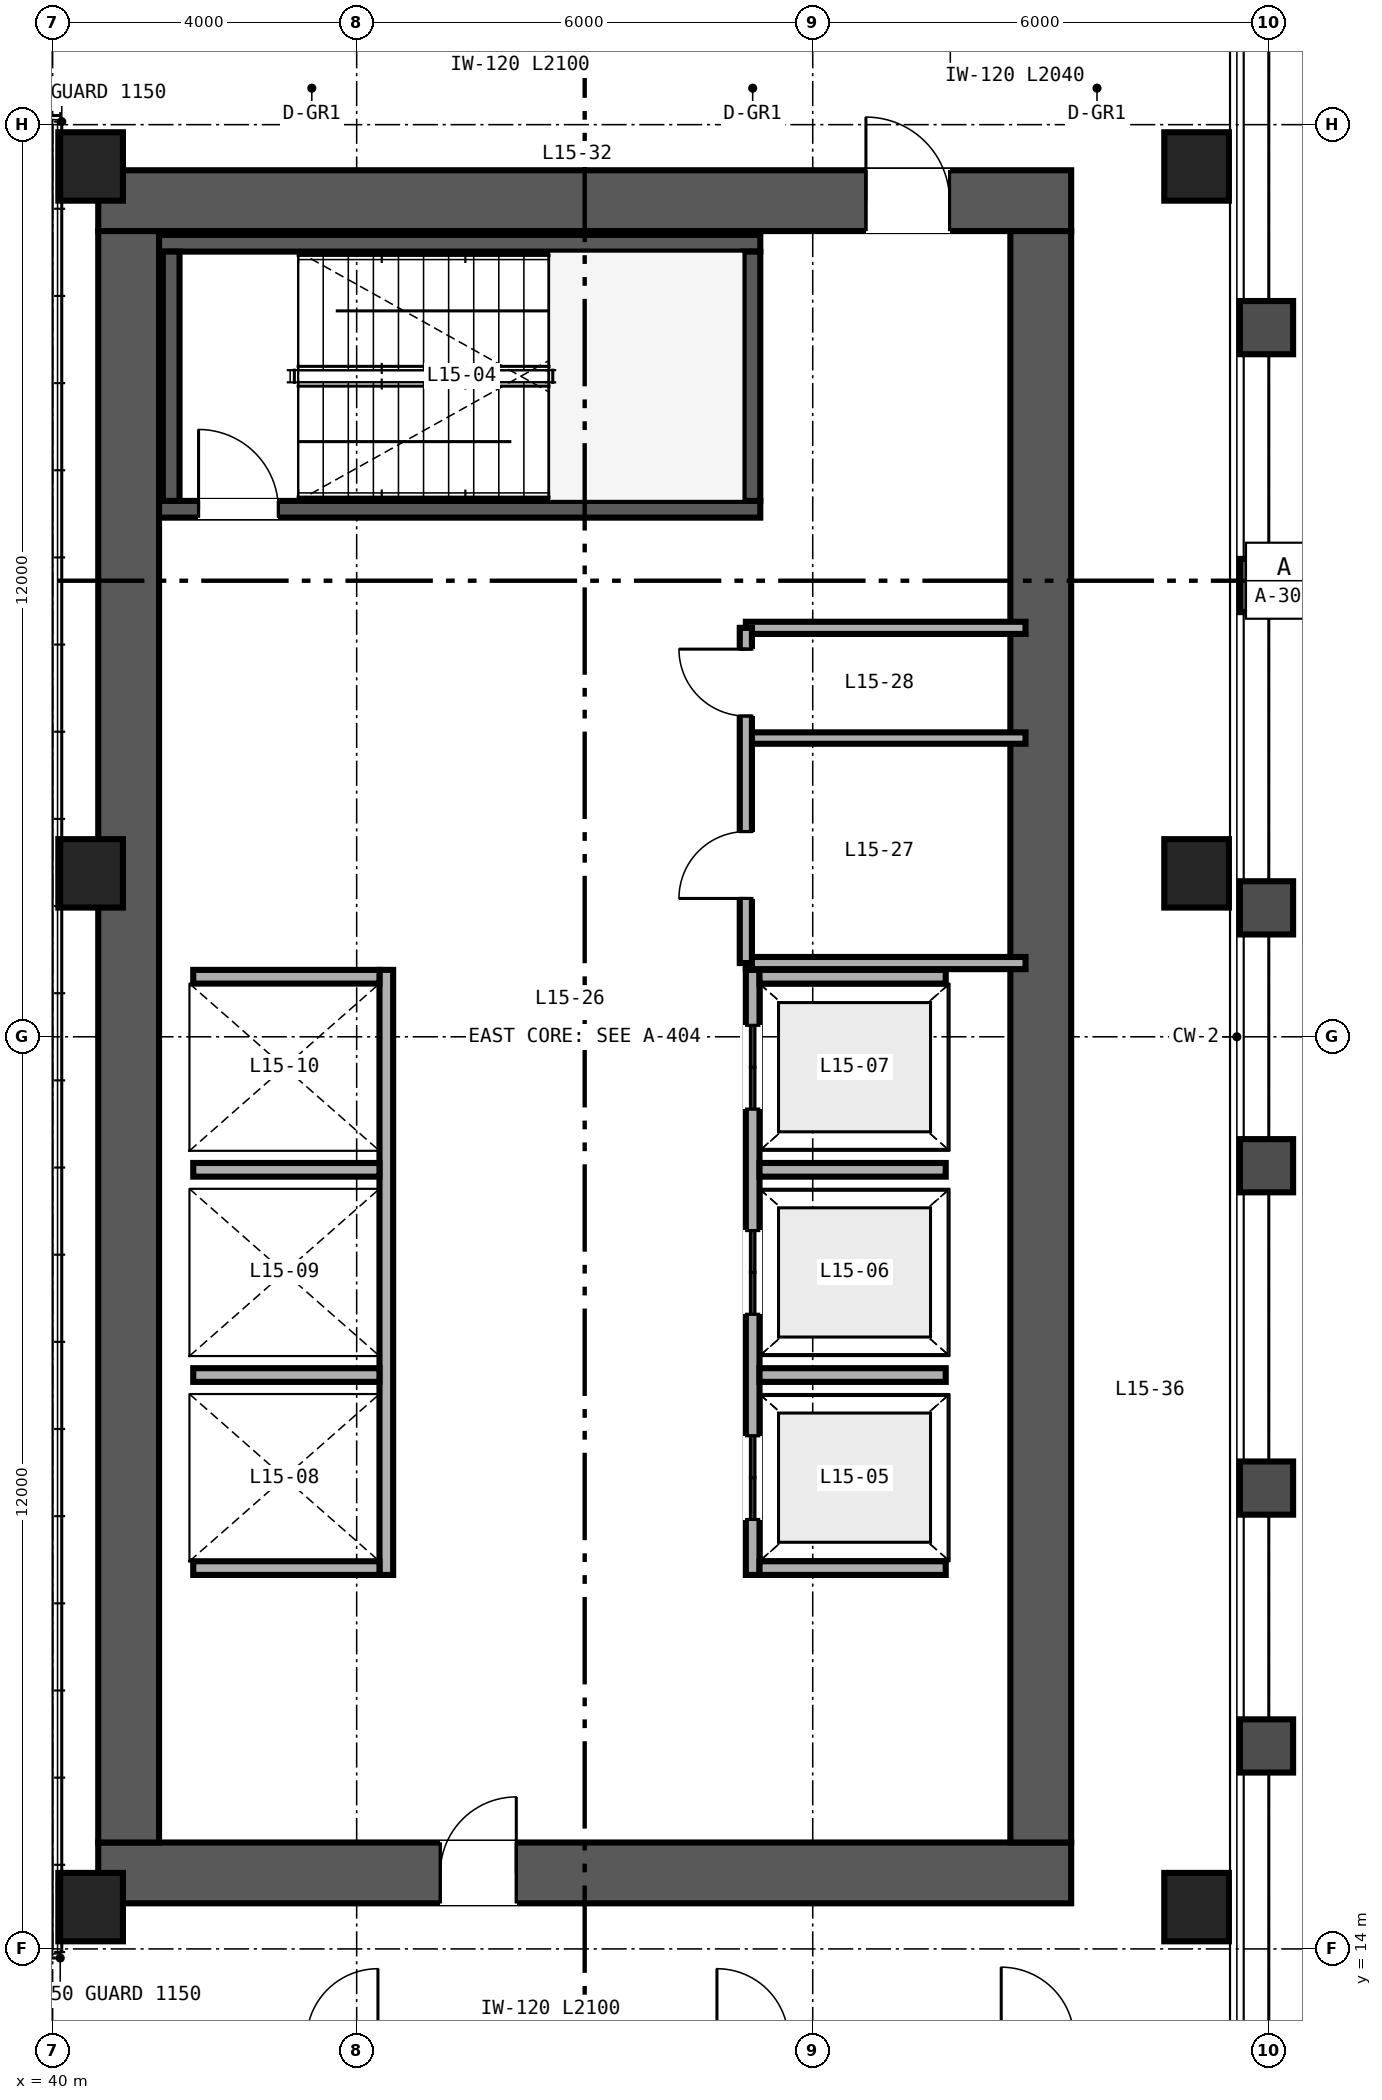
"""IFC4 building model, lengths in metres.
Left out: names, types, materials, properties, quantities, classifications, styles, units other than length and angle.
Written with IfcOpenShell. Run it as: python <this file> out.ifc"""

import sys

from ifc_helpers import new_model, si_unit, direction, frame, frame_2d, origin, origin_2d, place, context, subcontext, project, spatial, rectangle, hollow_rectangle, extrude, source, transform, mapped, element, fill, save


model = new_model("IFC4")
c1 = context("Model", 3, precision=1e-05, world=origin(), true_north=direction((0.0, 1.0)))
c2 = subcontext(c1, "Body", "Model", "MODEL_VIEW")
j1 = project(units=[si_unit("LENGTHUNIT", "METRE"), si_unit("PLANEANGLEUNIT", "RADIAN")], contexts=[c1])
p1 = place(None, origin())
s1 = spatial("IfcSite", under=j1, at=p1, CompositionType="ELEMENT")
p2 = place(p1, origin())
s2 = spatial("IfcBuilding", under=s1, at=p2, CompositionType="ELEMENT")
p3 = place(p2, frame((0.0, 0.0, 63.6)))
s3 = spatial("IfcBuildingStorey", under=s2, at=p3, CompositionType="ELEMENT", Elevation=63.6)
p4 = place(p3, frame((40.6, 15.0, 0.0), z_axis=(0.0, 0.0, 1.0), x_axis=(1.0, 0.0, 0.0)))
e1 = element("IfcWall", 1, at=p4, inside=s3, PredefinedType="SHEAR", context=c2, shape_type="SweptSolid", body=[
    extrude(rectangle(XDim=12.8, YDim=0.8, at=frame_2d((6.4, 0.0))), origin(), (0.0, 0.0, 1.0), 3.35),
])
p5 = place(p4, frame((4.5, 0.0, 0.0)))
e2 = element("IfcOpeningElement", 2, at=p5, cuts=e1, PredefinedType="OPENING", context=c2, shape_type="SweptSolid", body=[
    extrude(rectangle(XDim=1.0, YDim=2.15, at=frame_2d((0.5, 1.075))), frame((0.0, 0.41, 0.0), z_axis=(0.0, -1.0, 0.0), x_axis=(1.0, 0.0, 0.0)), (0.0, 0.0, 1.0), 0.82),
])
p6 = place(p3, frame((40.6, 37.0, 0.0), z_axis=(0.0, 0.0, 1.0), x_axis=(1.0, 0.0, 0.0)))
e3 = element("IfcWall", 3, at=p6, inside=s3, PredefinedType="SHEAR", context=c2, shape_type="SweptSolid", body=[
    extrude(rectangle(XDim=12.8, YDim=0.8, at=frame_2d((6.4, 0.0))), origin(), (0.0, 0.0, 1.0), 3.35),
])
p7 = place(p6, frame((10.1, 0.0, 0.0)))
e4 = element("IfcOpeningElement", 4, at=p7, cuts=e3, PredefinedType="OPENING", context=c2, shape_type="SweptSolid", body=[
    extrude(rectangle(XDim=1.1, YDim=2.15, at=frame_2d((0.55, 1.075))), frame((0.0, 0.41, 0.0), z_axis=(0.0, -1.0, 0.0), x_axis=(1.0, 0.0, 0.0)), (0.0, 0.0, 1.0), 0.82),
])
for number, where, z_axis, x_axis in (
    (5, (41.0, 15.4, 0.0), (0.0, 0.0, 1.0), (0.0, 1.0, 0.0)),
    (6, (53.0, 15.4, 0.0), (0.0, 0.0, 1.0), (0.0, 1.0, 0.0)),
):
    element("IfcWall", number, at=place(p3, frame(where, z_axis=z_axis, x_axis=x_axis)), inside=s3, PredefinedType="SHEAR", context=c2, shape_type="SweptSolid", body=[
        extrude(rectangle(XDim=21.2, YDim=0.8, at=frame_2d((10.6, 0.0))), origin(), (0.0, 0.0, 1.0), 3.35),
    ])
p8 = place(p3, frame((41.4, 32.94, 0.0), z_axis=(0.0, 0.0, 1.0), x_axis=(1.0, 0.0, 0.0)))
e7 = element("IfcWall", 7, at=p8, inside=s3, PredefinedType="SHEAR", context=c2, shape_type="SweptSolid", body=[
    extrude(rectangle(XDim=7.91, YDim=0.22, at=frame_2d((3.955, 0.0))), origin(), (0.0, 0.0, 1.0), 3.4),
])
p9 = place(p8, frame((0.52, 0.0, 0.0)))
e8 = element("IfcOpeningElement", 8, at=p9, cuts=e7, PredefinedType="OPENING", context=c2, shape_type="SweptSolid", body=[
    extrude(rectangle(XDim=1.05, YDim=2.15, at=frame_2d((0.525, 1.075))), frame((0.0, 0.12, 0.0), z_axis=(0.0, -1.0, 0.0), x_axis=(1.0, 0.0, 0.0)), (0.0, 0.0, 1.0), 0.24),
])
p10 = place(p3, frame((41.4, 36.44, 0.0), z_axis=(0.0, 0.0, 1.0), x_axis=(1.0, 0.0, 0.0)))
e9 = element("IfcWall", 9, at=p10, inside=s3, PredefinedType="SHEAR", context=c2, shape_type="SweptSolid", body=[
    extrude(rectangle(XDim=7.91, YDim=0.22, at=frame_2d((3.955, 0.0))), origin(), (0.0, 0.0, 1.0), 3.4),
])
for number, where, z_axis, x_axis in (
    (10, (41.56, 33.05, 0.0), (0.0, 0.0, 1.0), (0.0, 1.0, 0.0)),
    (11, (49.2, 33.05, 0.0), (0.0, 0.0, 1.0), (0.0, 1.0, 0.0)),
):
    element("IfcWall", number, at=place(p3, frame(where, z_axis=z_axis, x_axis=x_axis)), inside=s3, PredefinedType="SHEAR", context=c2, shape_type="SweptSolid", body=[
        extrude(rectangle(XDim=3.28, YDim=0.22, at=frame_2d((1.64, 0.0))), origin(), (0.0, 0.0, 1.0), 3.4),
    ])
m1 = source(origin(), c2, "Body", "SweptSolid", [
    extrude(hollow_rectangle(XDim=0.85, YDim=0.9, WallThickness=0.04, at=origin_2d()), origin(), (0.0, 0.0, 1.0), 3.35),
])
for number, where, z_axis, x_axis in (
    (12, (40.5, 14.55, 0.0), (0.0, 0.0, 1.0), (1.0, 0.0, 0.0)),
    (13, (55.05, 14.55, 0.0), (0.0, 0.0, 1.0), (1.0, 0.0, 0.0)),
    (14, (40.5, 28.15, 0.0), (0.0, 0.0, 1.0), (1.0, 0.0, 0.0)),
    (15, (55.05, 28.15, 0.0), (0.0, 0.0, 1.0), (1.0, 0.0, 0.0)),
    (16, (40.5, 37.45, 0.0), (0.0, 0.0, 1.0), (1.0, 0.0, 0.0)),
    (17, (55.05, 37.45, 0.0), (0.0, 0.0, 1.0), (1.0, 0.0, 0.0)),
):
    element("IfcColumn", number, at=place(p3, frame(where, z_axis=z_axis, x_axis=x_axis)), inside=s3, PredefinedType="COLUMN", context=c2, shape_type="MappedRepresentation", body=[
        mapped(m1, transform((0.0, 0.0, 0.0), scale=1.0)),
    ])
p11 = place(p3, frame((49.21, 18.92, 0.0), z_axis=(0.0, 0.0, 1.0), x_axis=(0.0, 1.0, 0.0)))
e18 = element("IfcWall", 18, at=p11, inside=s3, PredefinedType="SOLIDWALL", context=c2, shape_type="SweptSolid", body=[
    extrude(rectangle(XDim=7.96, YDim=0.18, at=frame_2d((3.98, 0.0))), origin(), (0.0, 0.0, 1.0), 3.35),
])
p12 = place(p11, frame((0.73, 0.0, 0.0)))
e19 = element("IfcOpeningElement", 19, at=p12, cuts=e18, PredefinedType="OPENING", context=c2, shape_type="SweptSolid", body=[
    extrude(rectangle(XDim=1.1, YDim=2.2, at=frame_2d((0.55, 1.1))), frame((0.0, 0.1, 0.0), z_axis=(0.0, -1.0, 0.0), x_axis=(1.0, 0.0, 0.0)), (0.0, 0.0, 1.0), 0.2),
])
p13 = place(p11, frame((3.43, 0.0, 0.0)))
e20 = element("IfcOpeningElement", 20, at=p13, cuts=e18, PredefinedType="OPENING", context=c2, shape_type="SweptSolid", body=[
    extrude(rectangle(XDim=1.1, YDim=2.2, at=frame_2d((0.55, 1.1))), frame((0.0, 0.1, 0.0), z_axis=(0.0, -1.0, 0.0), x_axis=(1.0, 0.0, 0.0)), (0.0, 0.0, 1.0), 0.2),
])
p14 = place(p11, frame((6.13, 0.0, 0.0)))
e21 = element("IfcOpeningElement", 21, at=p14, cuts=e18, PredefinedType="OPENING", context=c2, shape_type="SweptSolid", body=[
    extrude(rectangle(XDim=1.1, YDim=2.2, at=frame_2d((0.55, 1.1))), frame((0.0, 0.1, 0.0), z_axis=(0.0, -1.0, 0.0), x_axis=(1.0, 0.0, 0.0)), (0.0, 0.0, 1.0), 0.2),
])
for number, where, z_axis, x_axis in (
    (22, (49.3, 19.01, 0.0), (0.0, 0.0, 1.0), (1.0, 0.0, 0.0)),
    (23, (49.3, 26.79, 0.0), (0.0, 0.0, 1.0), (1.0, 0.0, 0.0)),
    (24, (49.3, 21.55, 0.0), (0.0, 0.0, 1.0), (1.0, 0.0, 0.0)),
    (25, (49.3, 24.25, 0.0), (0.0, 0.0, 1.0), (1.0, 0.0, 0.0)),
):
    element("IfcWall", number, at=place(p3, frame(where, z_axis=z_axis, x_axis=x_axis)), inside=s3, PredefinedType="SOLIDWALL", context=c2, shape_type="SweptSolid", body=[
        extrude(rectangle(XDim=2.45, YDim=0.18, at=frame_2d((1.225, 0.0))), origin(), (0.0, 0.0, 1.0), 3.35),
    ])
p15 = place(p3, frame((44.39, 18.92, 0.0), z_axis=(0.0, 0.0, 1.0), x_axis=(0.0, 1.0, 0.0)))
e26 = element("IfcWall", 26, at=p15, inside=s3, PredefinedType="SOLIDWALL", context=c2, shape_type="SweptSolid", body=[
    extrude(rectangle(XDim=7.96, YDim=0.18, at=frame_2d((3.98, 0.0))), origin(), (0.0, 0.0, 1.0), 3.35),
])
for number, where, z_axis, x_axis in (
    (27, (41.85, 19.01, 0.0), (0.0, 0.0, 1.0), (1.0, 0.0, 0.0)),
    (28, (41.85, 26.79, 0.0), (0.0, 0.0, 1.0), (1.0, 0.0, 0.0)),
    (29, (41.85, 21.55, 0.0), (0.0, 0.0, 1.0), (1.0, 0.0, 0.0)),
    (30, (41.85, 24.25, 0.0), (0.0, 0.0, 1.0), (1.0, 0.0, 0.0)),
):
    element("IfcWall", number, at=place(p3, frame(where, z_axis=z_axis, x_axis=x_axis)), inside=s3, PredefinedType="SOLIDWALL", context=c2, shape_type="SweptSolid", body=[
        extrude(rectangle(XDim=2.45, YDim=0.18, at=frame_2d((1.225, 0.0))), origin(), (0.0, 0.0, 1.0), 3.35),
    ])
p16 = place(p3, frame((49.12, 26.97, 0.0), z_axis=(0.0, 0.0, 1.0), x_axis=(1.0, 0.0, 0.0)))
e31 = element("IfcWall", 31, at=p16, inside=s3, PredefinedType="PARTITIONING", context=c2, shape_type="SweptSolid", body=[
    extrude(rectangle(XDim=3.68, YDim=0.16, at=frame_2d((1.84, 0.0))), origin(), (0.0, 0.0, 1.0), 3.35),
])
p17 = place(p3, frame((49.12, 31.38, 0.0), z_axis=(0.0, 0.0, 1.0), x_axis=(1.0, 0.0, 0.0)))
e32 = element("IfcWall", 32, at=p17, inside=s3, PredefinedType="PARTITIONING", context=c2, shape_type="SweptSolid", body=[
    extrude(rectangle(XDim=3.68, YDim=0.16, at=frame_2d((1.84, 0.0))), origin(), (0.0, 0.0, 1.0), 2.36),
])
p18 = place(p3, frame((49.12, 29.93, 0.0), z_axis=(0.0, 0.0, 1.0), x_axis=(1.0, 0.0, 0.0)))
e33 = element("IfcWall", 33, at=p18, inside=s3, PredefinedType="PARTITIONING", context=c2, shape_type="SweptSolid", body=[
    extrude(rectangle(XDim=3.68, YDim=0.15, at=frame_2d((1.84, 0.0))), origin(), (0.0, 0.0, 1.0), 3.35),
])
p19 = place(p3, frame((49.12, 26.97, 0.0), z_axis=(0.0, 0.0, 1.0), x_axis=(0.0, 1.0, 0.0)))
e34 = element("IfcWall", 34, at=p19, inside=s3, PredefinedType="PARTITIONING", context=c2, shape_type="SweptSolid", body=[
    extrude(rectangle(XDim=4.41, YDim=0.16, at=frame_2d((2.205, 0.0))), origin(), (0.0, 0.0, 1.0), 2.36),
])
p20 = place(p19, frame((0.85, 0.0, 0.0)))
e35 = element("IfcOpeningElement", 35, at=p20, cuts=e34, PredefinedType="OPENING", context=c2, shape_type="SweptSolid", body=[
    extrude(rectangle(XDim=0.88, YDim=2.15, at=frame_2d((0.44, 1.075))), frame((0.0, 0.09, 0.0), z_axis=(0.0, -1.0, 0.0), x_axis=(1.0, 0.0, 0.0)), (0.0, 0.0, 1.0), 0.18),
])
p21 = place(p19, frame((3.25, 0.0, 0.0)))
e36 = element("IfcOpeningElement", 36, at=p21, cuts=e34, PredefinedType="OPENING", context=c2, shape_type="SweptSolid", body=[
    extrude(rectangle(XDim=0.88, YDim=2.15, at=frame_2d((0.44, 1.075))), frame((0.0, 0.09, 0.0), z_axis=(0.0, -1.0, 0.0), x_axis=(1.0, 0.0, 0.0)), (0.0, 0.0, 1.0), 0.18),
])
m2 = source(origin(), c2, "Body", "SweptSolid", [
    extrude(rectangle(XDim=1.05, YDim=2.15, at=frame_2d((0.525, 1.075))), frame((0.0, 0.025, 0.0), z_axis=(0.0, -1.0, 0.0), x_axis=(1.0, 0.0, 0.0)), (0.0, 0.0, 1.0), 0.05),
])
p22 = place(p9, origin())
e37 = element("IfcDoor", 37, at=p22, inside=s3, OperationType="SINGLE_SWING_LEFT", PredefinedType="DOOR", context=c2, shape_type="MappedRepresentation", body=[
    mapped(m2, transform((0.0, 0.0, 0.0), scale=1.0)),
])
fill(e8, e37)
m3 = source(origin(), c2, "Body", "SweptSolid", [
    extrude(rectangle(XDim=1.1, YDim=2.2, at=frame_2d((0.55, 1.1))), frame((0.0, 0.025, 0.0), z_axis=(0.0, -1.0, 0.0), x_axis=(1.0, 0.0, 0.0)), (0.0, 0.0, 1.0), 0.05),
])
p23 = place(p12, origin())
e38 = element("IfcDoor", 38, at=p23, inside=s3, OperationType="DOUBLE_DOOR_SLIDING", PredefinedType="DOOR", context=c2, shape_type="MappedRepresentation", body=[
    mapped(m3, transform((0.0, 0.0, 0.0), scale=1.0)),
])
fill(e19, e38)
p24 = place(p13, origin())
e39 = element("IfcDoor", 39, at=p24, inside=s3, OperationType="DOUBLE_DOOR_SLIDING", PredefinedType="DOOR", context=c2, shape_type="MappedRepresentation", body=[
    mapped(m3, transform((0.0, 0.0, 0.0), scale=1.0)),
])
fill(e20, e39)
p25 = place(p14, origin())
e40 = element("IfcDoor", 40, at=p25, inside=s3, OperationType="DOUBLE_DOOR_SLIDING", PredefinedType="DOOR", context=c2, shape_type="MappedRepresentation", body=[
    mapped(m3, transform((0.0, 0.0, 0.0), scale=1.0)),
])
fill(e21, e40)
m4 = source(origin(), c2, "Body", "SweptSolid", [
    extrude(rectangle(XDim=1.0, YDim=2.15, at=frame_2d((0.5, 1.075))), frame((0.0, 0.025, 0.0), z_axis=(0.0, -1.0, 0.0), x_axis=(1.0, 0.0, 0.0)), (0.0, 0.0, 1.0), 0.05),
])
p26 = place(p5, origin())
e41 = element("IfcDoor", 41, at=p26, inside=s3, OperationType="SINGLE_SWING_RIGHT", PredefinedType="DOOR", context=c2, shape_type="MappedRepresentation", body=[
    mapped(m4, transform((0.0, 0.0, 0.0), scale=1.0)),
])
fill(e2, e41)
m5 = source(origin(), c2, "Body", "SweptSolid", [
    extrude(rectangle(XDim=1.1, YDim=2.15, at=frame_2d((0.55, 1.075))), frame((0.0, 0.025, 0.0), z_axis=(0.0, -1.0, 0.0), x_axis=(1.0, 0.0, 0.0)), (0.0, 0.0, 1.0), 0.05),
])
p27 = place(p7, origin())
e42 = element("IfcDoor", 42, at=p27, inside=s3, OperationType="SINGLE_SWING_LEFT", PredefinedType="DOOR", context=c2, shape_type="MappedRepresentation", body=[
    mapped(m5, transform((0.0, 0.0, 0.0), scale=1.0)),
])
fill(e4, e42)
m6 = source(origin(), c2, "Body", "SweptSolid", [
    extrude(rectangle(XDim=0.88, YDim=2.15, at=frame_2d((0.44, 1.075))), frame((0.0, 0.025, 0.0), z_axis=(0.0, -1.0, 0.0), x_axis=(1.0, 0.0, 0.0)), (0.0, 0.0, 1.0), 0.05),
])
p28 = place(p20, origin())
e43 = element("IfcDoor", 43, at=p28, inside=s3, OperationType="SINGLE_SWING_LEFT", PredefinedType="DOOR", context=c2, shape_type="MappedRepresentation", body=[
    mapped(m6, transform((0.0, 0.0, 0.0), scale=1.0)),
])
fill(e35, e43)
p29 = place(p21, origin())
e44 = element("IfcDoor", 44, at=p29, inside=s3, OperationType="SINGLE_SWING_RIGHT", PredefinedType="DOOR", context=c2, shape_type="MappedRepresentation", body=[
    mapped(m6, transform((0.0, 0.0, 0.0), scale=1.0)),
])
fill(e36, e44)
save(model, sys.argv[1])
